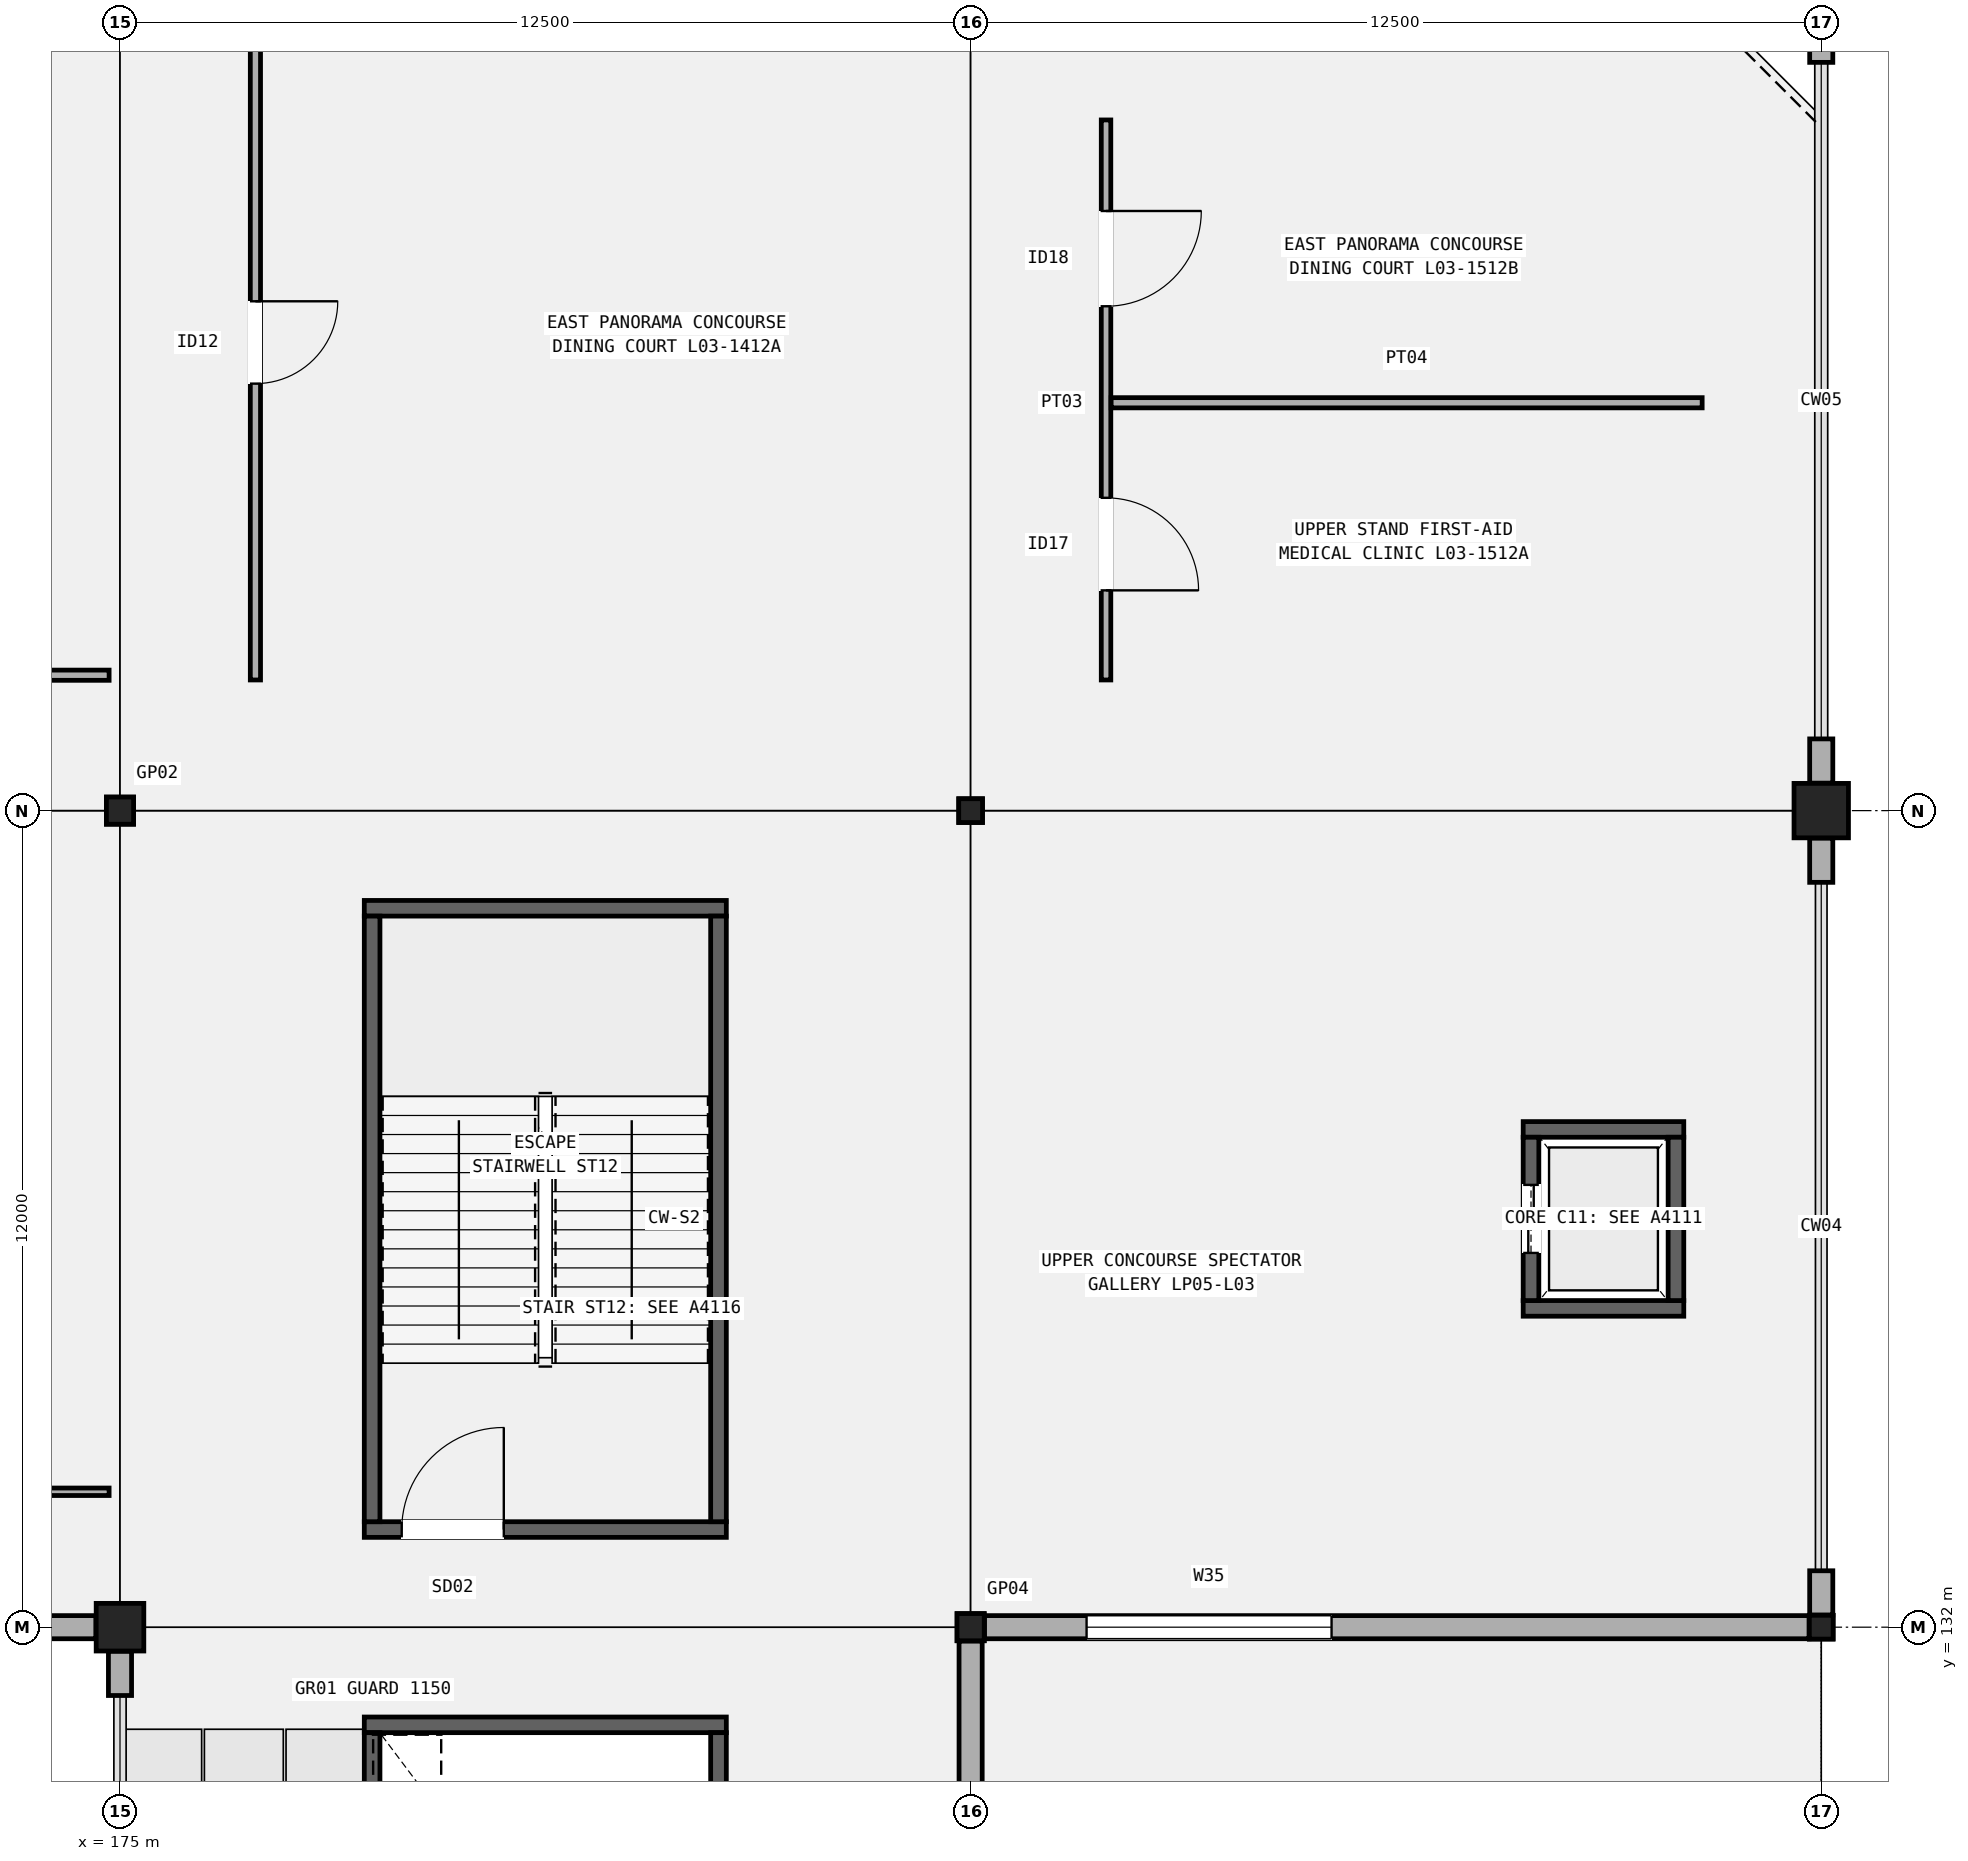
"""IFC4 building model, lengths in metres.
Left out: names, types, materials, properties, quantities, classifications, styles, units other than length and angle.
Written with IfcOpenShell. Run it as: python <this file> out.ifc"""

import sys

from ifc_helpers import new_model, si_unit, direction, frame, frame_2d, origin, origin_2d, place, context, subcontext, project, spatial, rectangle, hollow_rectangle, extrude, element, fill, save


model = new_model("IFC4")
c1 = context("Model", 3, precision=1e-05, world=origin(), true_north=direction((0.0, 1.0)))
c2 = subcontext(c1, "Body", "Model", "MODEL_VIEW")
j1 = project(units=[si_unit("LENGTHUNIT", "METRE"), si_unit("PLANEANGLEUNIT", "RADIAN")], contexts=[c1])
p1 = place(None, origin())
s1 = spatial("IfcSite", under=j1, at=p1, CompositionType="ELEMENT")
p2 = place(p1, origin())
s2 = spatial("IfcBuilding", under=s1, at=p2, CompositionType="ELEMENT")
p3 = place(p2, frame((0.0, 0.0, 15.3)))
s3 = spatial("IfcBuildingStorey", under=s2, at=p3, CompositionType="ELEMENT", Elevation=15.3)
p4 = place(p3, frame((175.0, 132.0, 0.0), z_axis=(0.0, 0.0, 1.0), x_axis=(1.0, 0.0, 0.0)))
e1 = element("IfcColumn", 1, at=p4, inside=s3, PredefinedType="COLUMN", context=c2, shape_type="SweptSolid", body=[
    extrude(rectangle(XDim=0.7, YDim=0.7, at=origin_2d()), origin(), (0.0, 0.0, 1.0), 5.1),
])
for number, where, z_axis, x_axis in (
    (2, (175.0, 144.0, 0.0), (0.0, 0.0, 1.0), (1.0, 0.0, 0.0)),
    (3, (187.5, 132.0, 0.0), (0.0, 0.0, 1.0), (1.0, 0.0, 0.0)),
):
    element("IfcColumn", number, at=place(p3, frame(where, z_axis=z_axis, x_axis=x_axis)), inside=s3, PredefinedType="COLUMN", context=c2, shape_type="SweptSolid", body=[
        extrude(hollow_rectangle(XDim=0.4, YDim=0.4, WallThickness=0.016, InnerFilletRadius=0.016, OuterFilletRadius=0.032, at=origin_2d()), origin(), (0.0, 0.0, 1.0), 5.1),
    ])
for number, where, z_axis, x_axis in (
    (4, (187.5, 144.0, 0.0), (0.0, 0.0, 1.0), (1.0, 0.0, 0.0)),
    (5, (200.0, 132.0, 0.0), (0.0, 0.0, 1.0), (1.0, 0.0, 0.0)),
):
    element("IfcColumn", number, at=place(p3, frame(where, z_axis=z_axis, x_axis=x_axis)), inside=s3, PredefinedType="COLUMN", context=c2, shape_type="SweptSolid", body=[
        extrude(hollow_rectangle(XDim=0.35, YDim=0.35, WallThickness=0.016, InnerFilletRadius=0.016, OuterFilletRadius=0.032, at=origin_2d()), origin(), (0.0, 0.0, 1.0), 5.1),
    ])
p5 = place(p3, frame((200.0, 144.0, 0.0), z_axis=(0.0, 0.0, 1.0), x_axis=(1.0, 0.0, 0.0)))
e6 = element("IfcColumn", 6, at=p5, inside=s3, PredefinedType="COLUMN", context=c2, shape_type="SweptSolid", body=[
    extrude(rectangle(XDim=0.8, YDim=0.8, at=origin_2d()), origin(), (0.0, 0.0, 1.0), 5.1),
])
p6 = place(p3, frame((162.904, 132.0, 0.0), z_axis=(0.0, 0.0, 1.0), x_axis=(1.0, 0.0, 0.0)))
e7 = element("IfcWall", 7, at=p6, inside=s3, PredefinedType="SOLIDWALL", context=c2, shape_type="SweptSolid", body=[
    extrude(rectangle(XDim=11.742, YDim=0.34, at=frame_2d((5.871, 0.0))), origin(), (0.0, 0.0, 1.0), 4.06),
])
p7 = place(p6, frame((1.5, 0.0, 0.95)))
e8 = element("IfcOpeningElement", 8, at=p7, cuts=e7, PredefinedType="OPENING", context=c2, shape_type="SweptSolid", body=[
    extrude(rectangle(XDim=2.1, YDim=2.6, at=frame_2d((1.05, 1.3))), frame((0.0, 0.18, 0.0), z_axis=(0.0, -1.0, 0.0), x_axis=(1.0, 0.0, 0.0)), (0.0, 0.0, 1.0), 0.36),
])
p8 = place(p3, frame((175.0, 130.996, 0.0), z_axis=(0.0, 0.0, 1.0), x_axis=(0.0, 1.0, 0.0)))
e9 = element("IfcWall", 9, at=p8, inside=s3, PredefinedType="SOLIDWALL", context=c2, shape_type="SweptSolid", body=[
    extrude(rectangle(XDim=0.65, YDim=0.34, at=frame_2d((0.325, 0.0))), origin(), (0.0, 0.0, 1.0), 4.06),
])
p9 = place(p3, frame((187.5, 120.354, 0.0), z_axis=(0.0, 0.0, 1.0), x_axis=(0.0, 1.0, 0.0)))
e10 = element("IfcWall", 10, at=p9, inside=s3, PredefinedType="SOLIDWALL", context=c2, shape_type="SweptSolid", body=[
    extrude(rectangle(XDim=11.442, YDim=0.34, at=frame_2d((5.721, 0.0))), origin(), (0.0, 0.0, 1.0), 4.16),
])
p10 = place(p9, frame((1.5, 0.0, 0.95)))
e11 = element("IfcOpeningElement", 11, at=p10, cuts=e10, PredefinedType="OPENING", context=c2, shape_type="SweptSolid", body=[
    extrude(rectangle(XDim=2.85, YDim=2.0, at=frame_2d((1.425, 1.0))), frame((0.0, 0.18, 0.0), z_axis=(0.0, -1.0, 0.0), x_axis=(1.0, 0.0, 0.0)), (0.0, 0.0, 1.0), 0.36),
])
p11 = place(p3, frame((187.704, 132.0, 0.0), z_axis=(0.0, 0.0, 1.0), x_axis=(1.0, 0.0, 0.0)))
e12 = element("IfcWall", 12, at=p11, inside=s3, PredefinedType="SOLIDWALL", context=c2, shape_type="SweptSolid", body=[
    extrude(rectangle(XDim=12.117, YDim=0.34, at=frame_2d((6.059, 0.0))), origin(), (0.0, 0.0, 1.0), 4.172),
])
p12 = place(p11, frame((1.5, 0.0, 0.95)))
e13 = element("IfcOpeningElement", 13, at=p12, cuts=e12, PredefinedType="OPENING", context=c2, shape_type="SweptSolid", body=[
    extrude(rectangle(XDim=3.6, YDim=1.75, at=frame_2d((1.8, 0.875))), frame((0.0, 0.18, 0.0), z_axis=(0.0, -1.0, 0.0), x_axis=(1.0, 0.0, 0.0)), (0.0, 0.0, 1.0), 0.36),
])
p13 = place(p3, frame((200.0, 132.179, 0.0), z_axis=(0.0, 0.0, 1.0), x_axis=(0.0, 1.0, 0.0)))
e14 = element("IfcWall", 14, at=p13, inside=s3, PredefinedType="SOLIDWALL", context=c2, shape_type="SweptSolid", body=[
    extrude(rectangle(XDim=0.65, YDim=0.34, at=frame_2d((0.325, 0.0))), origin(), (0.0, 0.0, 1.0), 4.06),
])
p14 = place(p3, frame((200.0, 142.946, 0.0), z_axis=(0.0, 0.0, 1.0), x_axis=(0.0, 1.0, 0.0)))
e15 = element("IfcWall", 15, at=p14, inside=s3, PredefinedType="SOLIDWALL", context=c2, shape_type="SweptSolid", body=[
    extrude(rectangle(XDim=0.65, YDim=0.34, at=frame_2d((0.325, 0.0))), origin(), (0.0, 0.0, 1.0), 4.06),
])
for number, where, z_axis, x_axis in (
    (16, (200.0, 144.404, 0.0), (0.0, 0.0, 1.0), (0.0, 1.0, 0.0)),
    (17, (200.0, 154.996, 0.0), (0.0, 0.0, 1.0), (0.0, 1.0, 0.0)),
):
    element("IfcWall", number, at=place(p3, frame(where, z_axis=z_axis, x_axis=x_axis)), inside=s3, PredefinedType="SOLIDWALL", context=c2, shape_type="SweptSolid", body=[
        extrude(rectangle(XDim=0.65, YDim=0.34, at=frame_2d((0.325, 0.0))), origin(), (0.0, 0.0, 1.0), 4.16),
    ])
p15 = place(p3, frame((178.59, 133.435, 0.0), z_axis=(0.0, 0.0, 1.0), x_axis=(1.0, 0.0, 0.0)))
e18 = element("IfcWall", 18, at=p15, inside=s3, PredefinedType="SHEAR", context=c2, shape_type="SweptSolid", body=[
    extrude(rectangle(XDim=5.32, YDim=0.23, at=frame_2d((2.66, 0.0))), origin(), (0.0, 0.0, 1.0), 4.86),
])
p16 = place(p15, frame((0.55, 0.0, 0.0)))
e19 = element("IfcOpeningElement", 19, at=p16, cuts=e18, PredefinedType="OPENING", context=c2, shape_type="SweptSolid", body=[
    extrude(rectangle(XDim=1.5, YDim=2.2, at=frame_2d((0.75, 1.1))), frame((0.0, 0.125, 0.0), z_axis=(0.0, -1.0, 0.0), x_axis=(1.0, 0.0, 0.0)), (0.0, 0.0, 1.0), 0.25),
])
p17 = place(p3, frame((178.59, 142.565, 0.0), z_axis=(0.0, 0.0, 1.0), x_axis=(1.0, 0.0, 0.0)))
e20 = element("IfcWall", 20, at=p17, inside=s3, PredefinedType="SHEAR", context=c2, shape_type="SweptSolid", body=[
    extrude(rectangle(XDim=5.32, YDim=0.23, at=frame_2d((2.66, 0.0))), origin(), (0.0, 0.0, 1.0), 4.86),
])
for number, where, z_axis, x_axis in (
    (21, (178.705, 133.55, 0.0), (0.0, 0.0, 1.0), (0.0, 1.0, 0.0)),
    (22, (183.795, 133.55, 0.0), (0.0, 0.0, 1.0), (0.0, 1.0, 0.0)),
):
    element("IfcWall", number, at=place(p3, frame(where, z_axis=z_axis, x_axis=x_axis)), inside=s3, PredefinedType="SHEAR", context=c2, shape_type="SweptSolid", body=[
        extrude(rectangle(XDim=8.9, YDim=0.23, at=frame_2d((4.45, 0.0))), origin(), (0.0, 0.0, 1.0), 4.86),
    ])
p18 = place(p3, frame((178.59, 130.565, 0.0), z_axis=(0.0, 0.0, 1.0), x_axis=(1.0, 0.0, 0.0)))
e23 = element("IfcWall", 23, at=p18, inside=s3, PredefinedType="SHEAR", context=c2, shape_type="SweptSolid", body=[
    extrude(rectangle(XDim=5.32, YDim=0.23, at=frame_2d((2.66, 0.0))), origin(), (0.0, 0.0, 1.0), 4.86),
])
for number, where, z_axis, x_axis in (
    (24, (178.705, 121.55, 0.0), (0.0, 0.0, 1.0), (0.0, 1.0, 0.0)),
    (25, (183.795, 121.55, 0.0), (0.0, 0.0, 1.0), (0.0, 1.0, 0.0)),
):
    element("IfcWall", number, at=place(p3, frame(where, z_axis=z_axis, x_axis=x_axis)), inside=s3, PredefinedType="SHEAR", context=c2, shape_type="SweptSolid", body=[
        extrude(rectangle(XDim=8.9, YDim=0.23, at=frame_2d((4.45, 0.0))), origin(), (0.0, 0.0, 1.0), 4.86),
    ])
for number, where, z_axis, x_axis in (
    (26, (195.62, 136.685, 0.0), (0.0, 0.0, 1.0), (1.0, 0.0, 0.0)),
    (27, (195.62, 139.315, 0.0), (0.0, 0.0, 1.0), (1.0, 0.0, 0.0)),
):
    element("IfcWall", number, at=place(p3, frame(where, z_axis=z_axis, x_axis=x_axis)), inside=s3, PredefinedType="SHEAR", context=c2, shape_type="SweptSolid", body=[
        extrude(rectangle(XDim=2.36, YDim=0.23, at=frame_2d((1.18, 0.0))), origin(), (0.0, 0.0, 1.0), 4.86),
    ])
p19 = place(p3, frame((195.735, 136.8, 0.0), z_axis=(0.0, 0.0, 1.0), x_axis=(0.0, 1.0, 0.0)))
e28 = element("IfcWall", 28, at=p19, inside=s3, PredefinedType="SHEAR", context=c2, shape_type="SweptSolid", body=[
    extrude(rectangle(XDim=2.4, YDim=0.23, at=frame_2d((1.2, 0.0))), origin(), (0.0, 0.0, 1.0), 4.86),
])
p20 = place(p19, frame((0.7, 0.0, 0.0)))
e29 = element("IfcOpeningElement", 29, at=p20, cuts=e28, PredefinedType="OPENING", context=c2, shape_type="SweptSolid", body=[
    extrude(rectangle(XDim=1.0, YDim=2.15, at=frame_2d((0.5, 1.075))), frame((0.0, 0.125, 0.0), z_axis=(0.0, -1.0, 0.0), x_axis=(1.0, 0.0, 0.0)), (0.0, 0.0, 1.0), 0.25),
])
p21 = place(p3, frame((197.865, 136.8, 0.0), z_axis=(0.0, 0.0, 1.0), x_axis=(0.0, 1.0, 0.0)))
e30 = element("IfcWall", 30, at=p21, inside=s3, PredefinedType="SHEAR", context=c2, shape_type="SweptSolid", body=[
    extrude(rectangle(XDim=2.4, YDim=0.23, at=frame_2d((1.2, 0.0))), origin(), (0.0, 0.0, 1.0), 4.86),
])
p22 = place(p3, frame((162.66, 133.99, 0.0), z_axis=(0.0, 0.0, 1.0), x_axis=(1.0, 0.0, 0.0)))
e31 = element("IfcWall", 31, at=p22, inside=s3, PredefinedType="PARTITIONING", context=c2, shape_type="SweptSolid", body=[
    extrude(rectangle(XDim=12.18, YDim=0.11, at=frame_2d((6.09, 0.0))), origin(), (0.0, 0.0, 1.0), 2.77),
])
p23 = place(p22, frame((2.524, 0.0, 0.0)))
e32 = element("IfcOpeningElement", 32, at=p23, cuts=e31, PredefinedType="OPENING", context=c2, shape_type="SweptSolid", body=[
    extrude(rectangle(XDim=0.9, YDim=2.06, at=frame_2d((0.45, 1.03))), frame((0.0, 0.065, 0.0), z_axis=(0.0, -1.0, 0.0), x_axis=(1.0, 0.0, 0.0)), (0.0, 0.0, 1.0), 0.13),
])
p24 = place(p22, frame((8.685, 0.0, 0.0)))
e33 = element("IfcOpeningElement", 33, at=p24, cuts=e31, PredefinedType="OPENING", context=c2, shape_type="SweptSolid", body=[
    extrude(rectangle(XDim=0.92, YDim=2.1, at=frame_2d((0.46, 1.05))), frame((0.0, 0.065, 0.0), z_axis=(0.0, -1.0, 0.0), x_axis=(1.0, 0.0, 0.0)), (0.0, 0.0, 1.0), 0.13),
])
p25 = place(p3, frame((162.66, 145.99, 0.0), z_axis=(0.0, 0.0, 1.0), x_axis=(1.0, 0.0, 0.0)))
e34 = element("IfcWall", 34, at=p25, inside=s3, PredefinedType="PARTITIONING", context=c2, shape_type="SweptSolid", body=[
    extrude(rectangle(XDim=12.18, YDim=0.15, at=frame_2d((6.09, 0.0))), origin(), (0.0, 0.0, 1.0), 4.22),
])
p26 = place(p25, frame((5.615, 0.0, 0.0)))
e35 = element("IfcOpeningElement", 35, at=p26, cuts=e34, PredefinedType="OPENING", context=c2, shape_type="SweptSolid", body=[
    extrude(rectangle(XDim=0.95, YDim=2.12, at=frame_2d((0.475, 1.06))), frame((0.0, 0.085, 0.0), z_axis=(0.0, -1.0, 0.0), x_axis=(1.0, 0.0, 0.0)), (0.0, 0.0, 1.0), 0.17),
])
p27 = place(p3, frame((176.99, 145.92, 0.0), z_axis=(0.0, 0.0, 1.0), x_axis=(0.0, 1.0, 0.0)))
e36 = element("IfcWall", 36, at=p27, inside=s3, PredefinedType="PARTITIONING", context=c2, shape_type="SweptSolid", body=[
    extrude(rectangle(XDim=10.056, YDim=0.15, at=frame_2d((5.028, 0.0))), origin(), (0.0, 0.0, 1.0), 2.77),
])
p28 = place(p27, frame((5.565, 0.0, 0.0), z_axis=(0.0, 0.0, 1.0), x_axis=(-1.0, 0.0, 0.0)))
e37 = element("IfcOpeningElement", 37, at=p28, cuts=e36, PredefinedType="OPENING", context=c2, shape_type="SweptSolid", body=[
    extrude(rectangle(XDim=1.21, YDim=2.18, at=frame_2d((0.605, 1.09))), frame((0.0, 0.085, 0.0), z_axis=(0.0, -1.0, 0.0), x_axis=(1.0, 0.0, 0.0)), (0.0, 0.0, 1.0), 0.17),
])
p29 = place(p3, frame((189.49, 145.92, 0.0), z_axis=(0.0, 0.0, 1.0), x_axis=(0.0, 1.0, 0.0)))
e38 = element("IfcWall", 38, at=p29, inside=s3, PredefinedType="PARTITIONING", context=c2, shape_type="SweptSolid", body=[
    extrude(rectangle(XDim=8.23, YDim=0.14, at=frame_2d((4.115, 0.0))), origin(), (0.0, 0.0, 1.0), 4.22),
])
p30 = place(p29, frame((2.677, 0.0, 0.0), z_axis=(0.0, 0.0, 1.0), x_axis=(-1.0, 0.0, 0.0)))
e39 = element("IfcOpeningElement", 39, at=p30, cuts=e38, PredefinedType="OPENING", context=c2, shape_type="SweptSolid", body=[
    extrude(rectangle(XDim=1.36, YDim=2.25, at=frame_2d((0.68, 1.125))), frame((0.0, 0.08, 0.0), z_axis=(0.0, -1.0, 0.0), x_axis=(1.0, 0.0, 0.0)), (0.0, 0.0, 1.0), 0.16),
])
p31 = place(p29, frame((6.892, 0.0, 0.0), z_axis=(0.0, 0.0, 1.0), x_axis=(-1.0, 0.0, 0.0)))
e40 = element("IfcOpeningElement", 40, at=p31, cuts=e38, PredefinedType="OPENING", context=c2, shape_type="SweptSolid", body=[
    extrude(rectangle(XDim=1.4, YDim=2.24, at=frame_2d((0.7, 1.12))), frame((0.0, 0.08, 0.0), z_axis=(0.0, -1.0, 0.0), x_axis=(1.0, 0.0, 0.0)), (0.0, 0.0, 1.0), 0.16),
])
p32 = place(p3, frame((189.565, 149.994, 0.0), z_axis=(0.0, 0.0, 1.0), x_axis=(1.0, 0.0, 0.0)))
e41 = element("IfcWall", 41, at=p32, inside=s3, PredefinedType="PARTITIONING", context=c2, shape_type="SweptSolid", body=[
    extrude(rectangle(XDim=8.685, YDim=0.15, at=frame_2d((4.343, 0.0))), origin(), (0.0, 0.0, 1.0), 4.22),
])
p33 = place(p12, origin())
e42 = element("IfcWindow", 42, at=p33, inside=s3, PartitioningType="SINGLE_PANEL", PredefinedType="WINDOW", context=c2, shape_type="SweptSolid", body=[
    extrude(rectangle(XDim=3.6, YDim=1.75, at=frame_2d((1.8, 0.875))), frame((0.0, 0.03, 0.0), z_axis=(0.0, -1.0, 0.0), x_axis=(1.0, 0.0, 0.0)), (0.0, 0.0, 1.0), 0.06),
])
fill(e13, e42)
p34 = place(p16, origin())
e43 = element("IfcDoor", 43, at=p34, inside=s3, OperationType="SINGLE_SWING_RIGHT", PredefinedType="DOOR", context=c2, shape_type="SweptSolid", body=[
    extrude(rectangle(XDim=1.5, YDim=2.2, at=frame_2d((0.75, 1.1))), frame((0.0, 0.025, 0.0), z_axis=(0.0, -1.0, 0.0), x_axis=(1.0, 0.0, 0.0)), (0.0, 0.0, 1.0), 0.05),
])
fill(e19, e43)
p35 = place(p20, origin())
e44 = element("IfcDoor", 44, at=p35, inside=s3, OperationType="DOUBLE_DOOR_SLIDING", PredefinedType="DOOR", context=c2, shape_type="SweptSolid", body=[
    extrude(rectangle(XDim=1.0, YDim=2.15, at=frame_2d((0.5, 1.075))), frame((0.0, 0.025, 0.0), z_axis=(0.0, -1.0, 0.0), x_axis=(1.0, 0.0, 0.0)), (0.0, 0.0, 1.0), 0.05),
])
fill(e29, e44)
p36 = place(p28, origin())
e45 = element("IfcDoor", 45, at=p36, inside=s3, OperationType="SINGLE_SWING_LEFT", PredefinedType="DOOR", context=c2, shape_type="SweptSolid", body=[
    extrude(rectangle(XDim=1.21, YDim=2.18, at=frame_2d((0.605, 1.09))), frame((0.0, 0.025, 0.0), z_axis=(0.0, -1.0, 0.0), x_axis=(1.0, 0.0, 0.0)), (0.0, 0.0, 1.0), 0.05),
])
fill(e37, e45)
p37 = place(p30, origin())
e46 = element("IfcDoor", 46, at=p37, inside=s3, OperationType="SINGLE_SWING_RIGHT", PredefinedType="DOOR", context=c2, shape_type="SweptSolid", body=[
    extrude(rectangle(XDim=1.36, YDim=2.25, at=frame_2d((0.68, 1.125))), frame((0.0, 0.025, 0.0), z_axis=(0.0, -1.0, 0.0), x_axis=(1.0, 0.0, 0.0)), (0.0, 0.0, 1.0), 0.05),
])
fill(e39, e46)
p38 = place(p31, origin())
e47 = element("IfcDoor", 47, at=p38, inside=s3, OperationType="SINGLE_SWING_LEFT", PredefinedType="DOOR", context=c2, shape_type="SweptSolid", body=[
    extrude(rectangle(XDim=1.4, YDim=2.24, at=frame_2d((0.7, 1.12))), frame((0.0, 0.025, 0.0), z_axis=(0.0, -1.0, 0.0), x_axis=(1.0, 0.0, 0.0)), (0.0, 0.0, 1.0), 0.05),
])
fill(e40, e47)
save(model, sys.argv[1])
